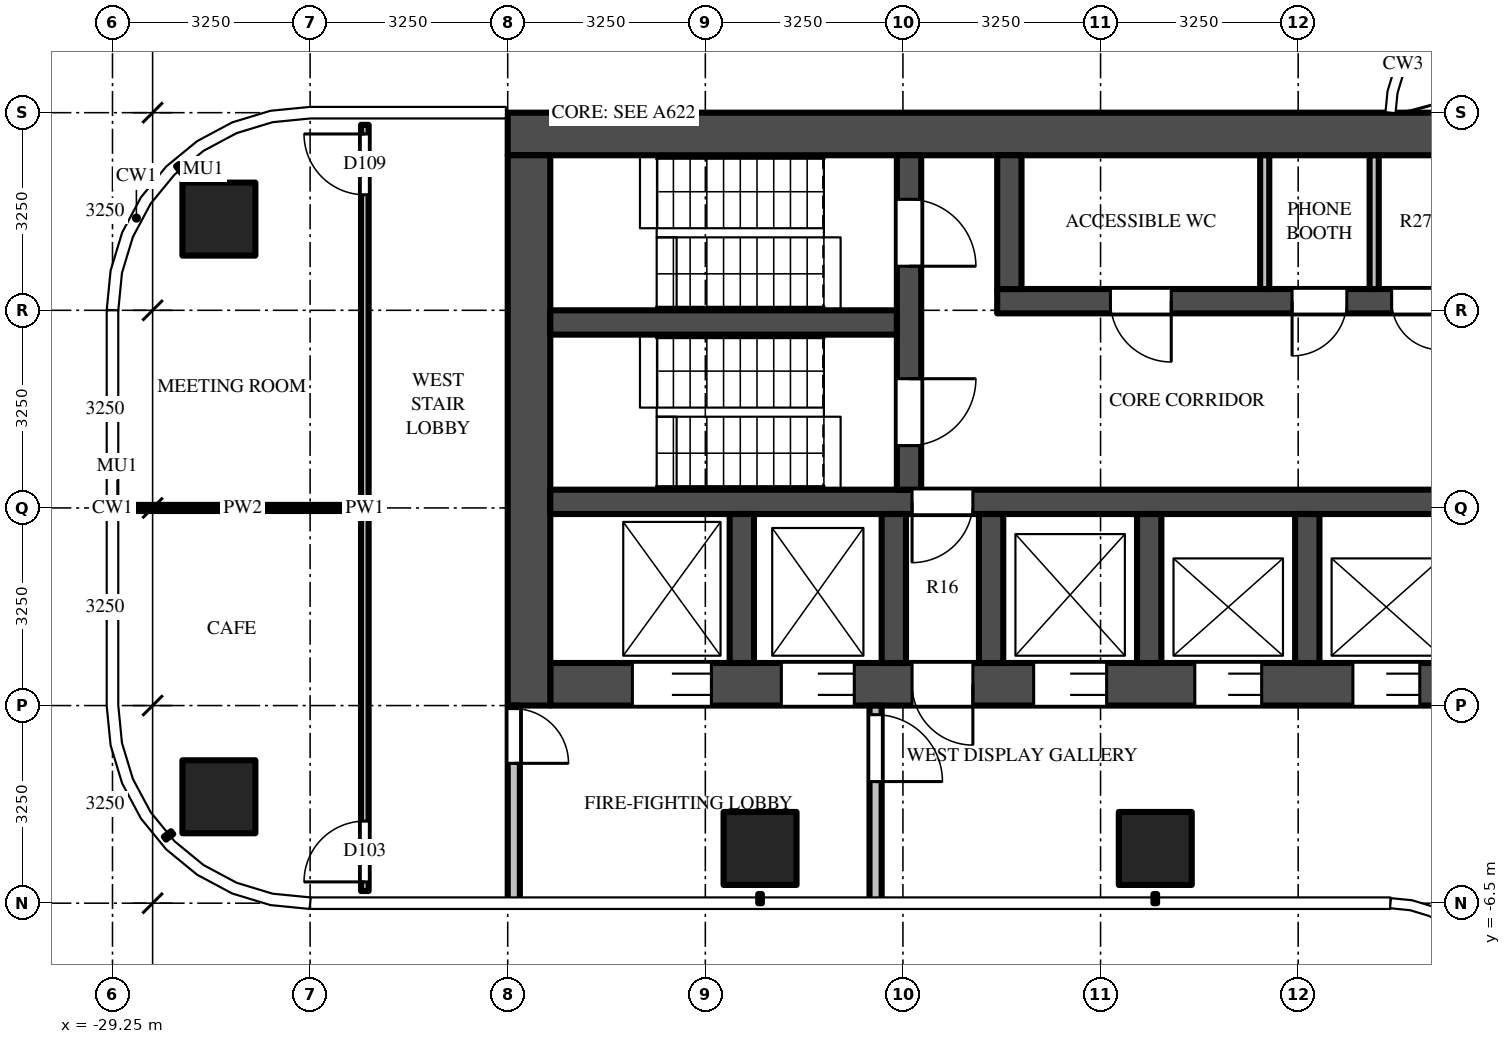
"""IFC4 building model, lengths in metres.
Left out: names, types, materials, properties, quantities, classifications, styles, units other than length and angle.
Written with IfcOpenShell. Run it as: python <this file> out.ifc"""

import sys

from ifc_helpers import new_model, si_unit, direction, frame, frame_2d, origin, origin_2d, place, context, subcontext, project, spatial, rectangle, extrude, source, transform, mapped, element, fill, save


model = new_model("IFC4")
c1 = context("Model", 3, precision=1e-05, world=origin(), true_north=direction((0.0, 1.0)))
c2 = subcontext(c1, "Body", "Model", "MODEL_VIEW")
j1 = project(units=[si_unit("LENGTHUNIT", "METRE"), si_unit("PLANEANGLEUNIT", "RADIAN")], contexts=[c1])
p1 = place(None, origin())
s1 = spatial("IfcSite", under=j1, at=p1, CompositionType="ELEMENT")
p2 = place(p1, origin())
s2 = spatial("IfcBuilding", under=s1, at=p2, CompositionType="ELEMENT")
p3 = place(p2, frame((0.0, 0.0, 185.4)))
s3 = spatial("IfcBuildingStorey", under=s2, at=p3, CompositionType="ELEMENT", Elevation=185.4)
m1 = source(origin(), c2, "Body", "SweptSolid", [
    extrude(rectangle(XDim=1.2, YDim=1.2, at=origin_2d()), origin(), (0.0, 0.0, 1.0), 3.9),
])
for number, where, z_axis, x_axis in (
    (1, (-12.1, -5.6, 0.0), (0.0, 0.0, 1.0), (1.0, 0.0, 0.0)),
    (2, (-18.6, -5.6, 0.0), (0.0, 0.0, 1.0), (1.0, 0.0, 0.0)),
    (3, (-27.5, -4.75, 0.0), (0.0, 0.0, 1.0), (1.0, 0.0, 0.0)),
    (4, (-27.5, 4.75, 0.0), (0.0, 0.0, 1.0), (1.0, 0.0, 0.0)),
):
    element("IfcColumn", number, at=place(p3, frame(where, z_axis=z_axis, x_axis=x_axis)), inside=s3, PredefinedType="COLUMN", context=c2, shape_type="MappedRepresentation", body=[
        mapped(m1, transform((0.0, 0.0, 0.0))),
    ])
m2 = source(origin(), c2, "Body", "SweptSolid", [
    extrude(rectangle(XDim=16.55, YDim=0.7, at=frame_2d((8.275, 0.0))), origin(), (0.0, 0.0, 1.0), 3.7),
])
p4 = place(p3, frame((-6.2, 6.15, 0.0), z_axis=(0.0, 0.0, 1.0), x_axis=(-1.0, 0.0, 0.0)))
e5 = element("IfcWall", 5, at=p4, inside=s3, PredefinedType="SHEAR", context=c2, shape_type="MappedRepresentation", body=[
    mapped(m2, transform((0.0, 0.0, 0.0))),
])
m3 = source(origin(), c2, "Body", "SweptSolid", [
    extrude(rectangle(XDim=14.85, YDim=0.7, at=frame_2d((7.425, 0.0))), origin(), (0.0, 0.0, 1.0), 3.7),
])
p5 = place(p3, frame((-7.2, -2.9, 0.0), z_axis=(0.0, 0.0, 1.0), x_axis=(-1.0, 0.0, 0.0)))
e6 = element("IfcWall", 6, at=p5, inside=s3, PredefinedType="SHEAR", context=c2, shape_type="MappedRepresentation", body=[
    mapped(m3, transform((0.0, 0.0, 0.0))),
])
m4 = source(origin(), c2, "Body", "SweptSolid", [
    extrude(rectangle(XDim=1.1, YDim=2.1, at=frame_2d((0.55, 1.05))), frame((0.0, 0.36, 0.0), z_axis=(0.0, -1.0, 0.0), x_axis=(1.0, 0.0, 0.0)), (0.0, 0.0, 1.0), 0.72),
])
p6 = place(p5, frame((0.55, 0.0, 0.0)))
e7 = element("IfcOpeningElement", 7, at=p6, cuts=e6, PredefinedType="OPENING", context=c2, shape_type="MappedRepresentation", body=[
    mapped(m4, transform((0.0, 0.0, 0.0))),
])
p7 = place(p5, frame((3.15, 0.0, 0.0)))
e8 = element("IfcOpeningElement", 8, at=p7, cuts=e6, PredefinedType="OPENING", context=c2, shape_type="MappedRepresentation", body=[
    mapped(m4, transform((0.0, 0.0, 0.0))),
])
m5 = source(origin(), c2, "Body", "SweptSolid", [
    extrude(rectangle(XDim=1.2, YDim=2.1, at=frame_2d((0.6, 1.05))), frame((0.0, 0.36, 0.0), z_axis=(0.0, -1.0, 0.0), x_axis=(1.0, 0.0, 0.0)), (0.0, 0.0, 1.0), 0.72),
])
p8 = place(p5, frame((5.7, 0.0, 0.0)))
e9 = element("IfcOpeningElement", 9, at=p8, cuts=e6, PredefinedType="OPENING", context=c2, shape_type="MappedRepresentation", body=[
    mapped(m5, transform((0.0, 0.0, 0.0))),
])
m6 = source(origin(), c2, "Body", "SweptSolid", [
    extrude(rectangle(XDim=1.3, YDim=2.1, at=frame_2d((0.65, 1.05))), frame((0.0, 0.36, 0.0), z_axis=(0.0, -1.0, 0.0), x_axis=(1.0, 0.0, 0.0)), (0.0, 0.0, 1.0), 0.72),
])
p9 = place(p5, frame((12.2, 0.0, 0.0)))
e10 = element("IfcOpeningElement", 10, at=p9, cuts=e6, PredefinedType="OPENING", context=c2, shape_type="MappedRepresentation", body=[
    mapped(m6, transform((0.0, 0.0, 0.0))),
])
p10 = place(p5, frame((9.85, 0.0, 0.0)))
e11 = element("IfcOpeningElement", 11, at=p10, cuts=e6, PredefinedType="OPENING", context=c2, shape_type="MappedRepresentation", body=[
    mapped(m5, transform((0.0, 0.0, 0.0))),
])
m7 = source(origin(), c2, "Body", "SweptSolid", [
    extrude(rectangle(XDim=1.0, YDim=2.1, at=frame_2d((0.5, 1.05))), frame((0.0, 0.36, 0.0), z_axis=(0.0, -1.0, 0.0), x_axis=(1.0, 0.0, 0.0)), (0.0, 0.0, 1.0), 0.72),
])
p11 = place(p5, frame((7.9, 0.0, 0.0)))
e12 = element("IfcOpeningElement", 12, at=p11, cuts=e6, PredefinedType="OPENING", context=c2, shape_type="MappedRepresentation", body=[
    mapped(m7, transform((0.0, 0.0, 0.0))),
])
m8 = source(origin(), c2, "Body", "SweptSolid", [
    extrude(rectangle(XDim=9.05, YDim=0.7, at=frame_2d((4.525, 0.0))), origin(), (0.0, 0.0, 1.0), 3.7),
])
p12 = place(p3, frame((-22.4, 5.8, 0.0), z_axis=(0.0, 0.0, 1.0), x_axis=(0.0, -1.0, 0.0)))
e13 = element("IfcWall", 13, at=p12, inside=s3, PredefinedType="SHEAR", context=c2, shape_type="MappedRepresentation", body=[
    mapped(m8, transform((0.0, 0.0, 0.0))),
])
m9 = source(origin(), c2, "Body", "SweptSolid", [
    extrude(rectangle(XDim=7.5, YDim=0.4, at=frame_2d((3.75, 0.0))), origin(), (0.0, 0.0, 1.0), 3.7),
])
p13 = place(p3, frame((-7.2, 3.4, 0.0), z_axis=(0.0, 0.0, 1.0), x_axis=(-1.0, 0.0, 0.0)))
e14 = element("IfcWall", 14, at=p13, inside=s3, PredefinedType="SHEAR", context=c2, shape_type="MappedRepresentation", body=[
    mapped(m9, transform((0.0, 0.0, 0.0))),
])
m10 = source(origin(), c2, "Body", "SweptSolid", [
    extrude(rectangle(XDim=0.8, YDim=2.1, at=frame_2d((0.4, 1.05))), frame((0.0, 0.21, 0.0), z_axis=(0.0, -1.0, 0.0), x_axis=(1.0, 0.0, 0.0)), (0.0, 0.0, 1.0), 0.42),
])
p14 = place(p13, frame((0.212, 0.0, 0.0)))
e15 = element("IfcOpeningElement", 15, at=p14, cuts=e14, PredefinedType="OPENING", context=c2, shape_type="MappedRepresentation", body=[
    mapped(m10, transform((0.0, 0.0, 0.0))),
])
m11 = source(origin(), c2, "Body", "SweptSolid", [
    extrude(rectangle(XDim=0.9, YDim=2.1, at=frame_2d((0.45, 1.05))), frame((0.0, 0.21, 0.0), z_axis=(0.0, -1.0, 0.0), x_axis=(1.0, 0.0, 0.0)), (0.0, 0.0, 1.0), 0.42),
])
p15 = place(p13, frame((1.75, 0.0, 0.0)))
e16 = element("IfcOpeningElement", 16, at=p15, cuts=e14, PredefinedType="OPENING", context=c2, shape_type="MappedRepresentation", body=[
    mapped(m11, transform((0.0, 0.0, 0.0))),
])
m12 = source(origin(), c2, "Body", "SweptSolid", [
    extrude(rectangle(XDim=1.0, YDim=2.1, at=frame_2d((0.5, 1.05))), frame((0.0, 0.21, 0.0), z_axis=(0.0, -1.0, 0.0), x_axis=(1.0, 0.0, 0.0)), (0.0, 0.0, 1.0), 0.42),
])
p16 = place(p13, frame((4.637, 0.0, 0.0)))
e17 = element("IfcOpeningElement", 17, at=p16, cuts=e14, PredefinedType="OPENING", context=c2, shape_type="MappedRepresentation", body=[
    mapped(m12, transform((0.0, 0.0, 0.0))),
])
m13 = source(origin(), c2, "Body", "SweptSolid", [
    extrude(rectangle(XDim=14.85, YDim=0.4, at=frame_2d((7.425, 0.0))), origin(), (0.0, 0.0, 1.0), 3.7),
])
p17 = place(p3, frame((-7.2, 0.1, 0.0), z_axis=(0.0, 0.0, 1.0), x_axis=(-1.0, 0.0, 0.0)))
e18 = element("IfcWall", 18, at=p17, inside=s3, PredefinedType="SHEAR", context=c2, shape_type="MappedRepresentation", body=[
    mapped(m13, transform((0.0, 0.0, 0.0))),
])
p18 = place(p17, frame((7.9, 0.0, 0.0)))
e19 = element("IfcOpeningElement", 19, at=p18, cuts=e18, PredefinedType="OPENING", context=c2, shape_type="MappedRepresentation", body=[
    mapped(m12, transform((0.0, 0.0, 0.0))),
])
m14 = source(origin(), c2, "Body", "SweptSolid", [
    extrude(rectangle(XDim=5.5, YDim=0.4, at=frame_2d((2.75, 0.0))), origin(), (0.0, 0.0, 1.0), 3.7),
])
p19 = place(p3, frame((-16.15, 5.8, 0.0), z_axis=(0.0, 0.0, 1.0), x_axis=(0.0, -1.0, 0.0)))
e20 = element("IfcWall", 20, at=p19, inside=s3, PredefinedType="SHEAR", context=c2, shape_type="MappedRepresentation", body=[
    mapped(m14, transform((0.0, 0.0, 0.0))),
])
m15 = source(origin(), c2, "Body", "SweptSolid", [
    extrude(rectangle(XDim=1.1, YDim=2.1, at=frame_2d((0.55, 1.05))), frame((0.0, 0.21, 0.0), z_axis=(0.0, -1.0, 0.0), x_axis=(1.0, 0.0, 0.0)), (0.0, 0.0, 1.0), 0.42),
])
p20 = place(p19, frame((0.725, 0.0, 0.0)))
e21 = element("IfcOpeningElement", 21, at=p20, cuts=e20, PredefinedType="OPENING", context=c2, shape_type="MappedRepresentation", body=[
    mapped(m15, transform((0.0, 0.0, 0.0))),
])
p21 = place(p19, frame((3.675, 0.0, 0.0)))
e22 = element("IfcOpeningElement", 22, at=p21, cuts=e20, PredefinedType="OPENING", context=c2, shape_type="MappedRepresentation", body=[
    mapped(m15, transform((0.0, 0.0, 0.0))),
])
m16 = source(origin(), c2, "Body", "SweptSolid", [
    extrude(rectangle(XDim=5.7, YDim=0.4, at=frame_2d((2.85, 0.0))), origin(), (0.0, 0.0, 1.0), 3.7),
])
p22 = place(p3, frame((-16.35, 3.05, 0.0), z_axis=(0.0, 0.0, 1.0), x_axis=(-1.0, 0.0, 0.0)))
e23 = element("IfcWall", 23, at=p22, inside=s3, PredefinedType="SHEAR", context=c2, shape_type="MappedRepresentation", body=[
    mapped(m16, transform((0.0, 0.0, 0.0))),
])
m17 = source(origin(), c2, "Body", "SweptSolid", [
    extrude(rectangle(XDim=2.2, YDim=0.4, at=frame_2d((1.1, 0.0))), origin(), (0.0, 0.0, 1.0), 3.7),
])
p23 = place(p3, frame((-14.5, 5.8, 0.0), z_axis=(0.0, 0.0, 1.0), x_axis=(0.0, -1.0, 0.0)))
e24 = element("IfcWall", 24, at=p23, inside=s3, PredefinedType="SHEAR", context=c2, shape_type="MappedRepresentation", body=[
    mapped(m17, transform((0.0, 0.0, 0.0))),
])
m18 = source(origin(), c2, "Body", "SweptSolid", [
    extrude(rectangle(XDim=2.45, YDim=0.4, at=frame_2d((1.225, 0.0))), origin(), (0.0, 0.0, 1.0), 3.7),
])
for number, where, z_axis, x_axis in (
    (25, (-9.6, -0.1, 0.0), (0.0, 0.0, 1.0), (0.0, -1.0, 0.0)),
    (26, (-12.2, -0.1, 0.0), (0.0, 0.0, 1.0), (0.0, -1.0, 0.0)),
    (27, (-14.8, -0.1, 0.0), (0.0, 0.0, 1.0), (0.0, -1.0, 0.0)),
    (28, (-16.4, -0.1, 0.0), (0.0, 0.0, 1.0), (0.0, -1.0, 0.0)),
    (29, (-18.9, -0.1, 0.0), (0.0, 0.0, 1.0), (0.0, -1.0, 0.0)),
):
    element("IfcWall", number, at=place(p3, frame(where, z_axis=z_axis, x_axis=x_axis)), inside=s3, PredefinedType="SHEAR", context=c2, shape_type="MappedRepresentation", body=[
        mapped(m18, transform((0.0, 0.0, 0.0))),
    ])
m19 = source(origin(), c2, "Body", "SweptSolid", [
    extrude(rectangle(XDim=3.25, YDim=0.2, at=frame_2d((1.625, 0.0))), origin(), (0.0, 0.0, 1.0), 3.7),
])
p24 = place(p3, frame((-16.7, -3.25, 0.0), z_axis=(0.0, 0.0, 1.0), x_axis=(0.0, -1.0, 0.0)))
e30 = element("IfcWall", 30, at=p24, inside=s3, PredefinedType="PARTITIONING", context=c2, shape_type="MappedRepresentation", body=[
    mapped(m19, transform((0.0, 0.0, 0.0))),
])
m20 = source(origin(), c2, "Body", "SweptSolid", [
    extrude(rectangle(XDim=1.1, YDim=2.1, at=frame_2d((0.55, 1.05))), frame((0.0, 0.11, 0.0), z_axis=(0.0, -1.0, 0.0), x_axis=(1.0, 0.0, 0.0)), (0.0, 0.0, 1.0), 0.22),
])
p25 = place(p24, frame((0.15, 0.0, 0.0)))
e31 = element("IfcOpeningElement", 31, at=p25, cuts=e30, PredefinedType="OPENING", context=c2, shape_type="MappedRepresentation", body=[
    mapped(m20, transform((0.0, 0.0, 0.0))),
])
p26 = place(p3, frame((-22.65, -3.25, 0.0), z_axis=(0.0, 0.0, 1.0), x_axis=(0.0, -1.0, 0.0)))
e32 = element("IfcWall", 32, at=p26, inside=s3, PredefinedType="PARTITIONING", context=c2, shape_type="MappedRepresentation", body=[
    mapped(m19, transform((0.0, 0.0, 0.0))),
])
m21 = source(origin(), c2, "Body", "SweptSolid", [
    extrude(rectangle(XDim=0.9, YDim=2.1, at=frame_2d((0.45, 1.05))), frame((0.0, 0.11, 0.0), z_axis=(0.0, -1.0, 0.0), x_axis=(1.0, 0.0, 0.0)), (0.0, 0.0, 1.0), 0.22),
])
p27 = place(p26, frame((0.05, 0.0, 0.0)))
e33 = element("IfcOpeningElement", 33, at=p27, cuts=e32, PredefinedType="OPENING", context=c2, shape_type="MappedRepresentation", body=[
    mapped(m21, transform((0.0, 0.0, 0.0))),
])
m22 = source(origin(), c2, "Body", "SweptSolid", [
    extrude(rectangle(XDim=2.2, YDim=0.15, at=frame_2d((1.1, 0.0))), origin(), (0.0, 0.0, 1.0), 3.7),
])
for number, where, z_axis, x_axis in (
    (34, (-8.5, 5.8, 0.0), (0.0, 0.0, 1.0), (0.0, -1.0, 0.0)),
    (35, (-10.3, 5.8, 0.0), (0.0, 0.0, 1.0), (0.0, -1.0, 0.0)),
):
    element("IfcWall", number, at=place(p3, frame(where, z_axis=z_axis, x_axis=x_axis)), inside=s3, PredefinedType="PARTITIONING", context=c2, shape_type="MappedRepresentation", body=[
        mapped(m22, transform((0.0, 0.0, 0.0))),
    ])
m23 = source(origin(), c2, "Body", "SweptSolid", [
    extrude(rectangle(XDim=12.6, YDim=0.125, at=frame_2d((6.3, 0.0))), origin(), (0.0, 0.0, 1.0), 2.78),
])
p28 = place(p3, frame((-25.1, -6.3, 0.0), z_axis=(0.0, 0.0, 1.0), x_axis=(0.0, 1.0, 0.0)))
e36 = element("IfcWall", 36, at=p28, inside=s3, PredefinedType="PARTITIONING", context=c2, shape_type="MappedRepresentation", body=[
    mapped(m23, transform((0.0, 0.0, 0.0))),
])
m24 = source(origin(), c2, "Body", "SweptSolid", [
    extrude(rectangle(XDim=1.0, YDim=2.1, at=frame_2d((0.5, 1.05))), frame((0.0, 0.073, 0.0), z_axis=(0.0, -1.0, 0.0), x_axis=(1.0, 0.0, 0.0)), (0.0, 0.0, 1.0), 0.145),
])
p29 = place(p28, frame((0.15, 0.0, 0.0)))
e37 = element("IfcOpeningElement", 37, at=p29, cuts=e36, PredefinedType="OPENING", context=c2, shape_type="MappedRepresentation", body=[
    mapped(m24, transform((0.0, 0.0, 0.0))),
])
p30 = place(p28, frame((11.45, 0.0, 0.0)))
e38 = element("IfcOpeningElement", 38, at=p30, cuts=e36, PredefinedType="OPENING", context=c2, shape_type="MappedRepresentation", body=[
    mapped(m24, transform((0.0, 0.0, 0.0))),
])
m25 = source(origin(), c2, "Body", "SweptSolid", [
    extrude(rectangle(XDim=3.887, YDim=0.1, at=frame_2d((1.944, 0.0))), origin(), (0.0, 0.0, 1.0), 2.78),
])
p31 = place(p3, frame((-29.05, 0.0, 0.0), z_axis=(0.0, 0.0, 1.0), x_axis=(1.0, 0.0, 0.0)))
e39 = element("IfcWall", 39, at=p31, inside=s3, PredefinedType="PARTITIONING", context=c2, shape_type="MappedRepresentation", body=[
    mapped(m25, transform((0.0, 0.0, 0.0))),
])
m26 = source(origin(), c2, "Body", "SweptSolid", [
    extrude(rectangle(XDim=1.1, YDim=2.1, at=frame_2d((0.55, 1.05))), frame((0.0, -0.275, 0.0), z_axis=(0.0, -1.0, 0.0), x_axis=(1.0, 0.0, 0.0)), (0.0, 0.0, 1.0), 0.05),
])
p32 = place(p6, origin())
e40 = element("IfcDoor", 40, at=p32, inside=s3, OperationType="DOUBLE_DOOR_SLIDING", PredefinedType="DOOR", context=c2, shape_type="MappedRepresentation", body=[
    mapped(m26, transform((0.0, 0.0, 0.0))),
])
fill(e7, e40)
p33 = place(p7, origin())
e41 = element("IfcDoor", 41, at=p33, inside=s3, OperationType="DOUBLE_DOOR_SLIDING", PredefinedType="DOOR", context=c2, shape_type="MappedRepresentation", body=[
    mapped(m26, transform((0.0, 0.0, 0.0))),
])
fill(e8, e41)
m27 = source(origin(), c2, "Body", "SweptSolid", [
    extrude(rectangle(XDim=1.2, YDim=2.1, at=frame_2d((0.6, 1.05))), frame((0.0, -0.275, 0.0), z_axis=(0.0, -1.0, 0.0), x_axis=(1.0, 0.0, 0.0)), (0.0, 0.0, 1.0), 0.05),
])
p34 = place(p8, origin())
e42 = element("IfcDoor", 42, at=p34, inside=s3, OperationType="DOUBLE_DOOR_SLIDING", PredefinedType="DOOR", context=c2, shape_type="MappedRepresentation", body=[
    mapped(m27, transform((0.0, 0.0, 0.0))),
])
fill(e9, e42)
m28 = source(origin(), c2, "Body", "SweptSolid", [
    extrude(rectangle(XDim=1.3, YDim=2.1, at=frame_2d((0.65, 1.05))), frame((0.0, -0.275, 0.0), z_axis=(0.0, -1.0, 0.0), x_axis=(1.0, 0.0, 0.0)), (0.0, 0.0, 1.0), 0.05),
])
p35 = place(p9, origin())
e43 = element("IfcDoor", 43, at=p35, inside=s3, OperationType="DOUBLE_DOOR_SLIDING", PredefinedType="DOOR", context=c2, shape_type="MappedRepresentation", body=[
    mapped(m28, transform((0.0, 0.0, 0.0))),
])
fill(e10, e43)
p36 = place(p10, origin())
e44 = element("IfcDoor", 44, at=p36, inside=s3, OperationType="DOUBLE_DOOR_SLIDING", PredefinedType="DOOR", context=c2, shape_type="MappedRepresentation", body=[
    mapped(m27, transform((0.0, 0.0, 0.0))),
])
fill(e11, e44)
m29 = source(origin(), c2, "Body", "SweptSolid", [
    extrude(rectangle(XDim=1.1, YDim=2.1, at=frame_2d((0.55, 1.05))), frame((0.0, 0.025, 0.0), z_axis=(0.0, -1.0, 0.0), x_axis=(1.0, 0.0, 0.0)), (0.0, 0.0, 1.0), 0.05),
])
p37 = place(p20, origin())
e45 = element("IfcDoor", 45, at=p37, inside=s3, OperationType="SINGLE_SWING_RIGHT", PredefinedType="DOOR", context=c2, shape_type="MappedRepresentation", body=[
    mapped(m29, transform((0.0, 0.0, 0.0))),
])
fill(e21, e45)
p38 = place(p21, origin())
e46 = element("IfcDoor", 46, at=p38, inside=s3, OperationType="SINGLE_SWING_LEFT", PredefinedType="DOOR", context=c2, shape_type="MappedRepresentation", body=[
    mapped(m29, transform((0.0, 0.0, 0.0))),
])
fill(e22, e46)
m30 = source(origin(), c2, "Body", "SweptSolid", [
    extrude(rectangle(XDim=1.0, YDim=2.1, at=frame_2d((0.5, 1.05))), frame((0.0, 0.025, 0.0), z_axis=(0.0, -1.0, 0.0), x_axis=(1.0, 0.0, 0.0)), (0.0, 0.0, 1.0), 0.05),
])
p39 = place(p18, origin())
e47 = element("IfcDoor", 47, at=p39, inside=s3, OperationType="SINGLE_SWING_RIGHT", PredefinedType="DOOR", context=c2, shape_type="MappedRepresentation", body=[
    mapped(m30, transform((0.0, 0.0, 0.0))),
])
fill(e19, e47)
m31 = source(origin(), c2, "Body", "SweptSolid", [
    extrude(rectangle(XDim=1.0, YDim=2.1, at=frame_2d((0.5, 1.05))), frame((0.0, -0.275, 0.0), z_axis=(0.0, -1.0, 0.0), x_axis=(1.0, 0.0, 0.0)), (0.0, 0.0, 1.0), 0.05),
])
p40 = place(p11, origin())
e48 = element("IfcDoor", 48, at=p40, inside=s3, OperationType="SINGLE_SWING_LEFT", PredefinedType="DOOR", context=c2, shape_type="MappedRepresentation", body=[
    mapped(m31, transform((0.0, 0.0, 0.0))),
])
fill(e12, e48)
p41 = place(p25, origin())
e49 = element("IfcDoor", 49, at=p41, inside=s3, OperationType="SINGLE_SWING_RIGHT", PredefinedType="DOOR", context=c2, shape_type="MappedRepresentation", body=[
    mapped(m29, transform((0.0, 0.0, 0.0))),
])
fill(e31, e49)
m32 = source(origin(), c2, "Body", "SweptSolid", [
    extrude(rectangle(XDim=0.9, YDim=2.1, at=frame_2d((0.45, 1.05))), frame((0.0, 0.025, 0.0), z_axis=(0.0, -1.0, 0.0), x_axis=(1.0, 0.0, 0.0)), (0.0, 0.0, 1.0), 0.05),
])
p42 = place(p27, origin())
e50 = element("IfcDoor", 50, at=p42, inside=s3, OperationType="SINGLE_SWING_RIGHT", PredefinedType="DOOR", context=c2, shape_type="MappedRepresentation", body=[
    mapped(m32, transform((0.0, 0.0, 0.0))),
])
fill(e33, e50)
m33 = source(origin(), c2, "Body", "SweptSolid", [
    extrude(rectangle(XDim=0.8, YDim=2.1, at=frame_2d((0.4, 1.05))), frame((0.0, 0.025, 0.0), z_axis=(0.0, -1.0, 0.0), x_axis=(1.0, 0.0, 0.0)), (0.0, 0.0, 1.0), 0.05),
])
p43 = place(p14, origin())
e51 = element("IfcDoor", 51, at=p43, inside=s3, OperationType="SINGLE_SWING_LEFT", PredefinedType="DOOR", context=c2, shape_type="MappedRepresentation", body=[
    mapped(m33, transform((0.0, 0.0, 0.0))),
])
fill(e15, e51)
p44 = place(p15, origin())
e52 = element("IfcDoor", 52, at=p44, inside=s3, OperationType="SINGLE_SWING_RIGHT", PredefinedType="DOOR", context=c2, shape_type="MappedRepresentation", body=[
    mapped(m32, transform((0.0, 0.0, 0.0))),
])
fill(e16, e52)
p45 = place(p16, origin())
e53 = element("IfcDoor", 53, at=p45, inside=s3, OperationType="SINGLE_SWING_LEFT", PredefinedType="DOOR", context=c2, shape_type="MappedRepresentation", body=[
    mapped(m30, transform((0.0, 0.0, 0.0))),
])
fill(e17, e53)
p46 = place(p29, origin())
e54 = element("IfcDoor", 54, at=p46, inside=s3, OperationType="SINGLE_SWING_LEFT", PredefinedType="DOOR", context=c2, shape_type="MappedRepresentation", body=[
    mapped(m30, transform((0.0, 0.0, 0.0))),
])
fill(e37, e54)
p47 = place(p30, origin())
e55 = element("IfcDoor", 55, at=p47, inside=s3, OperationType="SINGLE_SWING_RIGHT", PredefinedType="DOOR", context=c2, shape_type="MappedRepresentation", body=[
    mapped(m30, transform((0.0, 0.0, 0.0))),
])
fill(e38, e55)
save(model, sys.argv[1])
